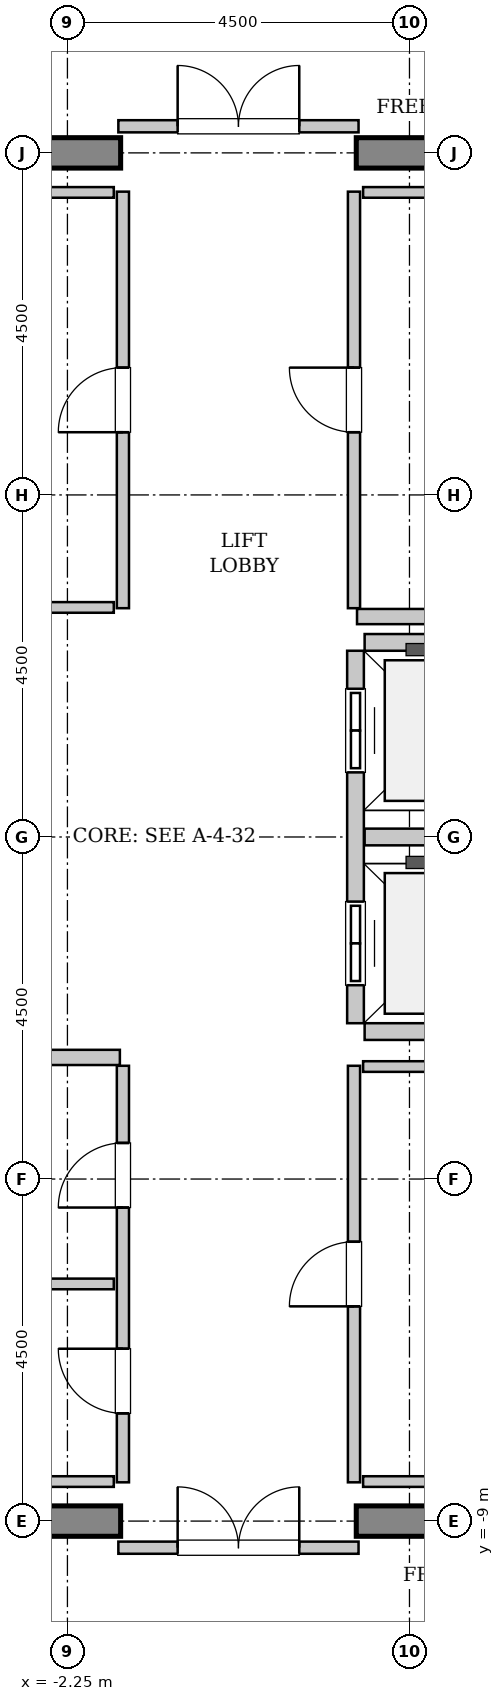
"""IFC4 building model, lengths in metres.
Left out: names, types, materials, properties, quantities, classifications, styles, units other than length and angle.
Written with IfcOpenShell. Run it as: python <this file> out.ifc"""

import sys

from ifc_helpers import new_model, si_unit, direction, frame, frame_2d, origin, place, context, subcontext, project, spatial, rectangle, extrude, source, transform, mapped, element, fill, save


model = new_model("IFC4")
c1 = context("Model", 3, precision=1e-05, world=origin(), true_north=direction((0.0, 1.0)))
c2 = subcontext(c1, "Body", "Model", "MODEL_VIEW")
j1 = project(units=[si_unit("LENGTHUNIT", "METRE"), si_unit("PLANEANGLEUNIT", "RADIAN")], contexts=[c1])
p1 = place(None, origin())
s1 = spatial("IfcSite", under=j1, at=p1, CompositionType="ELEMENT")
p2 = place(p1, origin())
s2 = spatial("IfcBuilding", under=s1, at=p2, CompositionType="ELEMENT")
p3 = place(p2, frame((0.0, 0.0, 353.8)))
s3 = spatial("IfcBuildingStorey", under=s2, at=p3, CompositionType="ELEMENT", Elevation=353.8)
m1 = source(origin(), c2, "Body", "SweptSolid", [
    extrude(rectangle(XDim=9.9, YDim=0.4, at=frame_2d((4.95, 0.0))), origin(), (0.0, 0.0, 1.0), 4.8),
])
for number, where, z_axis, x_axis in (
    (1, (-11.45, 9.0, 0.0), (0.0, 0.0, 1.0), (1.0, 0.0, 0.0)),
    (2, (1.55, 9.0, 0.0), (0.0, 0.0, 1.0), (1.0, 0.0, 0.0)),
    (3, (-11.45, -9.0, 0.0), (0.0, 0.0, 1.0), (1.0, 0.0, 0.0)),
    (4, (1.55, -9.0, 0.0), (0.0, 0.0, 1.0), (1.0, 0.0, 0.0)),
):
    element("IfcWall", number, at=place(p3, frame(where, z_axis=z_axis, x_axis=x_axis)), inside=s3, PredefinedType="SHEAR", context=c2, shape_type="MappedRepresentation", body=[
        mapped(m1, transform((0.0, 0.0, 0.0), x_axis=(1.0, 0.0, 0.0), y_axis=(0.0, 1.0, 0.0), z_axis=(0.0, 0.0, 1.0), scale=1.0)),
    ])
m2 = source(origin(), c2, "Body", "SweptSolid", [
    extrude(rectangle(XDim=4.9, YDim=0.22, at=frame_2d((2.45, 0.0))), origin(), (0.0, 0.0, 1.0), 4.485),
])
p4 = place(p3, frame((1.54, 2.45, 0.0), z_axis=(0.0, 0.0, 1.0), x_axis=(0.0, -1.0, 0.0)))
e5 = element("IfcWall", 5, at=p4, inside=s3, PredefinedType="SOLIDWALL", context=c2, shape_type="MappedRepresentation", body=[
    mapped(m2, transform((0.0, 0.0, 0.0), x_axis=(1.0, 0.0, 0.0), y_axis=(0.0, 1.0, 0.0), z_axis=(0.0, 0.0, 1.0), scale=1.0)),
])
p5 = place(p4, frame((3.3, 0.0, 0.0)))
e6 = element("IfcOpeningElement", 6, at=p5, cuts=e5, PredefinedType="OPENING", context=c2, shape_type="SweptSolid", body=[
    extrude(rectangle(XDim=1.1, YDim=2.2, at=frame_2d((0.55, 1.1))), frame((0.0, 0.12, 0.0), z_axis=(0.0, -1.0, 0.0), x_axis=(1.0, 0.0, 0.0)), (0.0, 0.0, 1.0), 0.24),
])
p6 = place(p4, frame((0.5, 0.0, 0.0)))
e7 = element("IfcOpeningElement", 7, at=p6, cuts=e5, PredefinedType="OPENING", context=c2, shape_type="SweptSolid", body=[
    extrude(rectangle(XDim=1.1, YDim=2.2, at=frame_2d((0.55, 1.1))), frame((0.0, 0.12, 0.0), z_axis=(0.0, -1.0, 0.0), x_axis=(1.0, 0.0, 0.0)), (0.0, 0.0, 1.0), 0.24),
])
m3 = source(origin(), c2, "Body", "SweptSolid", [
    extrude(rectangle(XDim=2.13, YDim=0.22, at=frame_2d((1.065, 0.0))), origin(), (0.0, 0.0, 1.0), 4.485),
])
for number, where, z_axis, x_axis in (
    (8, (1.66, -2.56, 0.0), (0.0, 0.0, 1.0), (1.0, 0.0, 0.0)),
    (9, (1.66, 0.0, 0.0), (0.0, 0.0, 1.0), (1.0, 0.0, 0.0)),
    (10, (3.79, 2.56, 0.0), (0.0, 0.0, 1.0), (-1.0, 0.0, 0.0)),
):
    element("IfcWall", number, at=place(p3, frame(where, z_axis=z_axis, x_axis=x_axis)), inside=s3, PredefinedType="SOLIDWALL", context=c2, shape_type="MappedRepresentation", body=[
        mapped(m3, transform((0.0, 0.0, 0.0), x_axis=(1.0, 0.0, 0.0), y_axis=(0.0, 1.0, 0.0), z_axis=(0.0, 0.0, 1.0), scale=1.0)),
    ])
m4 = source(origin(), c2, "Body", "SweptSolid", [
    extrude(rectangle(XDim=2.52, YDim=0.2, at=frame_2d((1.26, 0.0))), origin(), (0.0, 0.0, 1.0), 4.485),
])
for number, where, z_axis, x_axis in (
    (11, (-4.08, -2.9, 0.0), (0.0, 0.0, 1.0), (1.0, 0.0, 0.0)),
    (12, (1.56, 2.9, 0.0), (0.0, 0.0, 1.0), (1.0, 0.0, 0.0)),
):
    element("IfcWall", number, at=place(p3, frame(where, z_axis=z_axis, x_axis=x_axis)), inside=s3, PredefinedType="PARTITIONING", context=c2, shape_type="MappedRepresentation", body=[
        mapped(m4, transform((0.0, 0.0, 0.0), x_axis=(1.0, 0.0, 0.0), y_axis=(0.0, 1.0, 0.0), z_axis=(0.0, 0.0, 1.0), scale=1.0)),
    ])
m5 = source(origin(), c2, "Body", "SweptSolid", [
    extrude(rectangle(XDim=3.16, YDim=0.16, at=frame_2d((1.58, 0.0))), origin(), (0.0, 0.0, 1.0), 3.575),
])
p7 = place(p3, frame((-1.58, 9.35, 0.0), z_axis=(0.0, 0.0, 1.0), x_axis=(1.0, 0.0, 0.0)))
e13 = element("IfcWall", 13, at=p7, inside=s3, PredefinedType="PARTITIONING", context=c2, shape_type="MappedRepresentation", body=[
    mapped(m5, transform((0.0, 0.0, 0.0), x_axis=(1.0, 0.0, 0.0), y_axis=(0.0, 1.0, 0.0), z_axis=(0.0, 0.0, 1.0), scale=1.0)),
])
p8 = place(p7, frame((0.78, 0.0, 0.0)))
e14 = element("IfcOpeningElement", 14, at=p8, cuts=e13, PredefinedType="OPENING", context=c2, shape_type="SweptSolid", body=[
    extrude(rectangle(XDim=1.6, YDim=2.3, at=frame_2d((0.8, 1.15))), frame((0.0, 0.09, 0.0), z_axis=(0.0, -1.0, 0.0), x_axis=(1.0, 0.0, 0.0)), (0.0, 0.0, 1.0), 0.18),
])
p9 = place(p3, frame((-1.58, -9.35, 0.0), z_axis=(0.0, 0.0, 1.0), x_axis=(1.0, 0.0, 0.0)))
e15 = element("IfcWall", 15, at=p9, inside=s3, PredefinedType="PARTITIONING", context=c2, shape_type="MappedRepresentation", body=[
    mapped(m5, transform((0.0, 0.0, 0.0), x_axis=(1.0, 0.0, 0.0), y_axis=(0.0, 1.0, 0.0), z_axis=(0.0, 0.0, 1.0), scale=1.0)),
])
p10 = place(p9, frame((0.78, 0.0, 0.0)))
e16 = element("IfcOpeningElement", 16, at=p10, cuts=e15, PredefinedType="OPENING", context=c2, shape_type="SweptSolid", body=[
    extrude(rectangle(XDim=1.6, YDim=2.3, at=frame_2d((0.8, 1.15))), frame((0.0, 0.09, 0.0), z_axis=(0.0, -1.0, 0.0), x_axis=(1.0, 0.0, 0.0)), (0.0, 0.0, 1.0), 0.18),
])
m6 = source(origin(), c2, "Body", "SweptSolid", [
    extrude(rectangle(XDim=5.48, YDim=0.16, at=frame_2d((2.74, 0.0))), origin(), (0.0, 0.0, 1.0), 4.485),
])
p11 = place(p3, frame((-1.52, 3.01, 0.0), z_axis=(0.0, 0.0, 1.0), x_axis=(0.0, 1.0, 0.0)))
e17 = element("IfcWall", 17, at=p11, inside=s3, PredefinedType="PARTITIONING", context=c2, shape_type="MappedRepresentation", body=[
    mapped(m6, transform((0.0, 0.0, 0.0), x_axis=(1.0, 0.0, 0.0), y_axis=(0.0, 1.0, 0.0), z_axis=(0.0, 0.0, 1.0), scale=1.0)),
])
p12 = place(p11, frame((2.315, 0.0, 0.0)))
e18 = element("IfcOpeningElement", 18, at=p12, cuts=e17, PredefinedType="OPENING", context=c2, shape_type="SweptSolid", body=[
    extrude(rectangle(XDim=0.85, YDim=2.1, at=frame_2d((0.425, 1.05))), frame((0.0, 0.09, 0.0), z_axis=(0.0, -1.0, 0.0), x_axis=(1.0, 0.0, 0.0)), (0.0, 0.0, 1.0), 0.18),
])
m7 = source(origin(), c2, "Body", "SweptSolid", [
    extrude(rectangle(XDim=3.15, YDim=0.14, at=frame_2d((1.575, 0.0))), origin(), (0.0, 0.0, 1.0), 4.485),
])
for number, where, z_axis, x_axis in (
    (19, (-4.79, 3.02, 0.0), (0.0, 0.0, 1.0), (1.0, 0.0, 0.0)),
    (20, (-4.79, 8.48, 0.0), (0.0, 0.0, 1.0), (1.0, 0.0, 0.0)),
):
    element("IfcWall", number, at=place(p3, frame(where, z_axis=z_axis, x_axis=x_axis)), inside=s3, PredefinedType="PARTITIONING", context=c2, shape_type="MappedRepresentation", body=[
        mapped(m7, transform((0.0, 0.0, 0.0), x_axis=(1.0, 0.0, 0.0), y_axis=(0.0, 1.0, 0.0), z_axis=(0.0, 0.0, 1.0), scale=1.0)),
    ])
p13 = place(p3, frame((-1.52, -8.49, 0.0), z_axis=(0.0, 0.0, 1.0), x_axis=(0.0, 1.0, 0.0)))
e21 = element("IfcWall", 21, at=p13, inside=s3, PredefinedType="PARTITIONING", context=c2, shape_type="MappedRepresentation", body=[
    mapped(m6, transform((0.0, 0.0, 0.0), x_axis=(1.0, 0.0, 0.0), y_axis=(0.0, 1.0, 0.0), z_axis=(0.0, 0.0, 1.0), scale=1.0)),
])
p14 = place(p13, frame((0.907, 0.0, 0.0)))
e22 = element("IfcOpeningElement", 22, at=p14, cuts=e21, PredefinedType="OPENING", context=c2, shape_type="SweptSolid", body=[
    extrude(rectangle(XDim=0.85, YDim=2.1, at=frame_2d((0.425, 1.05))), frame((0.0, 0.09, 0.0), z_axis=(0.0, -1.0, 0.0), x_axis=(1.0, 0.0, 0.0)), (0.0, 0.0, 1.0), 0.18),
])
p15 = place(p13, frame((3.615, 0.0, 0.0)))
e23 = element("IfcOpeningElement", 23, at=p15, cuts=e21, PredefinedType="OPENING", context=c2, shape_type="SweptSolid", body=[
    extrude(rectangle(XDim=0.85, YDim=2.1, at=frame_2d((0.425, 1.05))), frame((0.0, 0.09, 0.0), z_axis=(0.0, -1.0, 0.0), x_axis=(1.0, 0.0, 0.0)), (0.0, 0.0, 1.0), 0.18),
])
m8 = source(origin(), c2, "Body", "SweptSolid", [
    extrude(rectangle(XDim=5.55, YDim=0.14, at=frame_2d((2.775, 0.0))), origin(), (0.0, 0.0, 1.0), 4.485),
])
p16 = place(p3, frame((-7.19, -5.88, 0.0), z_axis=(0.0, 0.0, 1.0), x_axis=(1.0, 0.0, 0.0)))
e24 = element("IfcWall", 24, at=p16, inside=s3, PredefinedType="PARTITIONING", context=c2, shape_type="MappedRepresentation", body=[
    mapped(m8, transform((0.0, 0.0, 0.0), x_axis=(1.0, 0.0, 0.0), y_axis=(0.0, 1.0, 0.0), z_axis=(0.0, 0.0, 1.0), scale=1.0)),
])
p17 = place(p3, frame((1.52, 3.01, 0.0), z_axis=(0.0, 0.0, 1.0), x_axis=(0.0, 1.0, 0.0)))
e25 = element("IfcWall", 25, at=p17, inside=s3, PredefinedType="PARTITIONING", context=c2, shape_type="MappedRepresentation", body=[
    mapped(m6, transform((0.0, 0.0, 0.0), x_axis=(1.0, 0.0, 0.0), y_axis=(0.0, 1.0, 0.0), z_axis=(0.0, 0.0, 1.0), scale=1.0)),
])
p18 = place(p17, frame((2.315, 0.0, 0.0)))
e26 = element("IfcOpeningElement", 26, at=p18, cuts=e25, PredefinedType="OPENING", context=c2, shape_type="SweptSolid", body=[
    extrude(rectangle(XDim=0.85, YDim=2.1, at=frame_2d((0.425, 1.05))), frame((0.0, 0.09, 0.0), z_axis=(0.0, -1.0, 0.0), x_axis=(1.0, 0.0, 0.0)), (0.0, 0.0, 1.0), 0.18),
])
for number, where, z_axis, x_axis in (
    (27, (1.64, 8.48, 0.0), (0.0, 0.0, 1.0), (1.0, 0.0, 0.0)),
    (28, (-4.79, -8.48, 0.0), (0.0, 0.0, 1.0), (1.0, 0.0, 0.0)),
):
    element("IfcWall", number, at=place(p3, frame(where, z_axis=z_axis, x_axis=x_axis)), inside=s3, PredefinedType="PARTITIONING", context=c2, shape_type="MappedRepresentation", body=[
        mapped(m7, transform((0.0, 0.0, 0.0), x_axis=(1.0, 0.0, 0.0), y_axis=(0.0, 1.0, 0.0), z_axis=(0.0, 0.0, 1.0), scale=1.0)),
    ])
p19 = place(p3, frame((1.52, -8.49, 0.0), z_axis=(0.0, 0.0, 1.0), x_axis=(0.0, 1.0, 0.0)))
e29 = element("IfcWall", 29, at=p19, inside=s3, PredefinedType="PARTITIONING", context=c2, shape_type="MappedRepresentation", body=[
    mapped(m6, transform((0.0, 0.0, 0.0), x_axis=(1.0, 0.0, 0.0), y_axis=(0.0, 1.0, 0.0), z_axis=(0.0, 0.0, 1.0), scale=1.0)),
])
p20 = place(p19, frame((2.315, 0.0, 0.0)))
e30 = element("IfcOpeningElement", 30, at=p20, cuts=e29, PredefinedType="OPENING", context=c2, shape_type="SweptSolid", body=[
    extrude(rectangle(XDim=0.85, YDim=2.1, at=frame_2d((0.425, 1.05))), frame((0.0, 0.09, 0.0), z_axis=(0.0, -1.0, 0.0), x_axis=(1.0, 0.0, 0.0)), (0.0, 0.0, 1.0), 0.18),
])
for number, where, z_axis, x_axis in (
    (31, (1.64, -3.02, 0.0), (0.0, 0.0, 1.0), (1.0, 0.0, 0.0)),
    (32, (1.64, -8.48, 0.0), (0.0, 0.0, 1.0), (1.0, 0.0, 0.0)),
):
    element("IfcWall", number, at=place(p3, frame(where, z_axis=z_axis, x_axis=x_axis)), inside=s3, PredefinedType="PARTITIONING", context=c2, shape_type="MappedRepresentation", body=[
        mapped(m7, transform((0.0, 0.0, 0.0), x_axis=(1.0, 0.0, 0.0), y_axis=(0.0, 1.0, 0.0), z_axis=(0.0, 0.0, 1.0), scale=1.0)),
    ])
m9 = source(origin(), c2, "Body", "SweptSolid", [
    extrude(rectangle(XDim=1.1, YDim=2.2, at=frame_2d((0.55, 1.1))), frame((0.0, 0.025, 0.0), z_axis=(0.0, -1.0, 0.0), x_axis=(1.0, 0.0, 0.0)), (0.0, 0.0, 1.0), 0.05),
])
p21 = place(p5, origin())
e33 = element("IfcDoor", 33, at=p21, inside=s3, OperationType="DOUBLE_DOOR_SLIDING", PredefinedType="DOOR", context=c2, shape_type="MappedRepresentation", body=[
    mapped(m9, transform((0.0, 0.0, 0.0), x_axis=(1.0, 0.0, 0.0), y_axis=(0.0, 1.0, 0.0), z_axis=(0.0, 0.0, 1.0), scale=1.0)),
])
fill(e6, e33)
p22 = place(p6, origin())
e34 = element("IfcDoor", 34, at=p22, inside=s3, OperationType="DOUBLE_DOOR_SLIDING", PredefinedType="DOOR", context=c2, shape_type="MappedRepresentation", body=[
    mapped(m9, transform((0.0, 0.0, 0.0), x_axis=(1.0, 0.0, 0.0), y_axis=(0.0, 1.0, 0.0), z_axis=(0.0, 0.0, 1.0), scale=1.0)),
])
fill(e7, e34)
m10 = source(origin(), c2, "Body", "SweptSolid", [
    extrude(rectangle(XDim=1.6, YDim=2.3, at=frame_2d((0.8, 1.15))), frame((0.0, 0.025, 0.0), z_axis=(0.0, -1.0, 0.0), x_axis=(1.0, 0.0, 0.0)), (0.0, 0.0, 1.0), 0.05),
])
p23 = place(p8, origin())
e35 = element("IfcDoor", 35, at=p23, inside=s3, OperationType="DOUBLE_DOOR_SINGLE_SWING", PredefinedType="DOOR", context=c2, shape_type="MappedRepresentation", body=[
    mapped(m10, transform((0.0, 0.0, 0.0), x_axis=(1.0, 0.0, 0.0), y_axis=(0.0, 1.0, 0.0), z_axis=(0.0, 0.0, 1.0), scale=1.0)),
])
fill(e14, e35)
p24 = place(p10, origin())
e36 = element("IfcDoor", 36, at=p24, inside=s3, OperationType="DOUBLE_DOOR_SINGLE_SWING", PredefinedType="DOOR", context=c2, shape_type="MappedRepresentation", body=[
    mapped(m10, transform((0.0, 0.0, 0.0), x_axis=(1.0, 0.0, 0.0), y_axis=(0.0, 1.0, 0.0), z_axis=(0.0, 0.0, 1.0), scale=1.0)),
])
fill(e16, e36)
m11 = source(origin(), c2, "Body", "SweptSolid", [
    extrude(rectangle(XDim=0.85, YDim=2.1, at=frame_2d((0.425, 1.05))), frame((0.0, 0.025, 0.0), z_axis=(0.0, -1.0, 0.0), x_axis=(1.0, 0.0, 0.0)), (0.0, 0.0, 1.0), 0.05),
])
p25 = place(p12, origin())
e37 = element("IfcDoor", 37, at=p25, inside=s3, OperationType="SINGLE_SWING_LEFT", PredefinedType="DOOR", context=c2, shape_type="MappedRepresentation", body=[
    mapped(m11, transform((0.0, 0.0, 0.0), x_axis=(1.0, 0.0, 0.0), y_axis=(0.0, 1.0, 0.0), z_axis=(0.0, 0.0, 1.0), scale=1.0)),
])
fill(e18, e37)
p26 = place(p14, origin())
e38 = element("IfcDoor", 38, at=p26, inside=s3, OperationType="SINGLE_SWING_RIGHT", PredefinedType="DOOR", context=c2, shape_type="MappedRepresentation", body=[
    mapped(m11, transform((0.0, 0.0, 0.0), x_axis=(1.0, 0.0, 0.0), y_axis=(0.0, 1.0, 0.0), z_axis=(0.0, 0.0, 1.0), scale=1.0)),
])
fill(e22, e38)
p27 = place(p15, origin())
e39 = element("IfcDoor", 39, at=p27, inside=s3, OperationType="SINGLE_SWING_LEFT", PredefinedType="DOOR", context=c2, shape_type="MappedRepresentation", body=[
    mapped(m11, transform((0.0, 0.0, 0.0), x_axis=(1.0, 0.0, 0.0), y_axis=(0.0, 1.0, 0.0), z_axis=(0.0, 0.0, 1.0), scale=1.0)),
])
fill(e23, e39)
p28 = place(p18, origin())
e40 = element("IfcDoor", 40, at=p28, inside=s3, OperationType="SINGLE_SWING_RIGHT", PredefinedType="DOOR", context=c2, shape_type="MappedRepresentation", body=[
    mapped(m11, transform((0.0, 0.0, 0.0), x_axis=(1.0, 0.0, 0.0), y_axis=(0.0, 1.0, 0.0), z_axis=(0.0, 0.0, 1.0), scale=1.0)),
])
fill(e26, e40)
p29 = place(p20, origin())
e41 = element("IfcDoor", 41, at=p29, inside=s3, OperationType="SINGLE_SWING_LEFT", PredefinedType="DOOR", context=c2, shape_type="MappedRepresentation", body=[
    mapped(m11, transform((0.0, 0.0, 0.0), x_axis=(1.0, 0.0, 0.0), y_axis=(0.0, 1.0, 0.0), z_axis=(0.0, 0.0, 1.0), scale=1.0)),
])
fill(e30, e41)
save(model, sys.argv[1])
